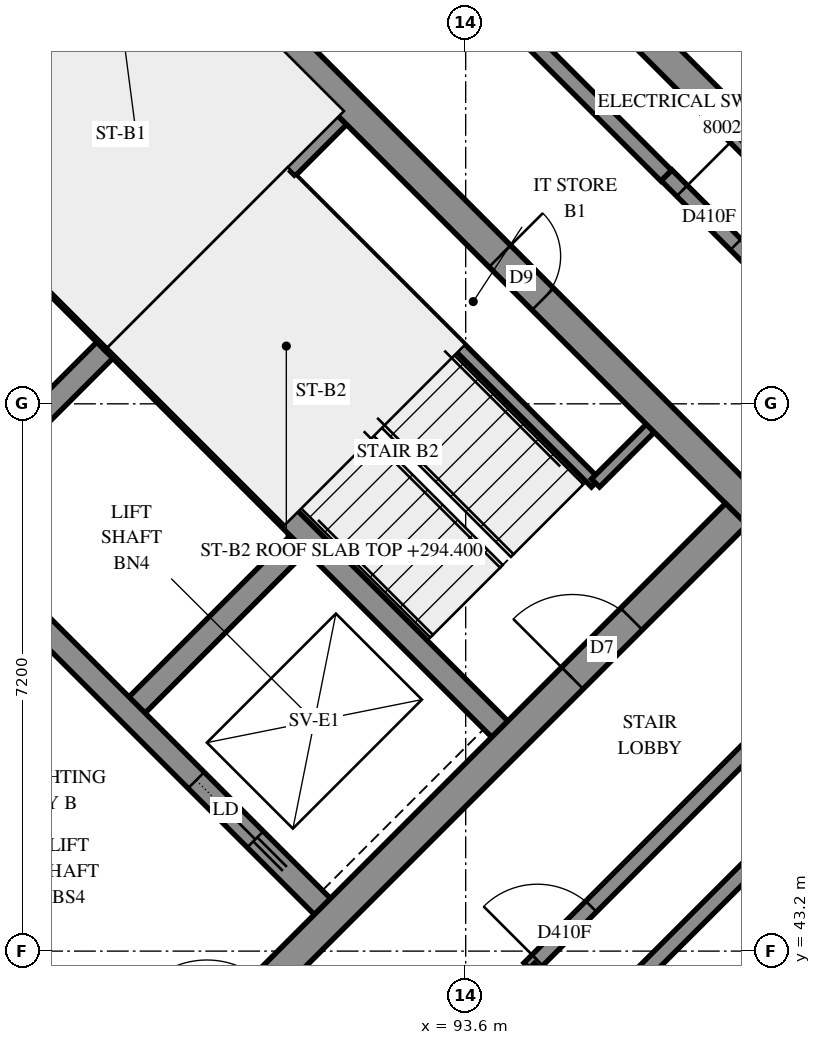
"""IFC4 building model, lengths in metres.
Left out: names, types, materials, properties, quantities, classifications, styles, units other than length and angle.
Written with IfcOpenShell. Run it as: python <this file> out.ifc"""

import sys

from ifc_helpers import new_model, si_unit, direction, frame, frame_2d, origin, place, context, subcontext, project, spatial, polyline, rectangle, outline, extrude, element, fill, save


model = new_model("IFC4")
c1 = context("Model", 3, precision=1e-05, world=origin(), true_north=direction((0.0, 1.0)))
c2 = subcontext(c1, "Body", "Model", "MODEL_VIEW")
j1 = project(units=[si_unit("LENGTHUNIT", "METRE"), si_unit("PLANEANGLEUNIT", "RADIAN")], contexts=[c1])
p1 = place(None, origin())
s1 = spatial("IfcSite", under=j1, at=p1, CompositionType="ELEMENT")
p2 = place(p1, origin())
s2 = spatial("IfcBuilding", under=s1, at=p2, CompositionType="ELEMENT")
p3 = place(p2, frame((0.0, 0.0, 294.4)))
s3 = spatial("IfcBuildingStorey", under=s2, at=p3, CompositionType="ELEMENT", Elevation=294.4)
p4 = place(p3, frame((86.695, 59.696, -0.3), z_axis=(0.0, 0.0, 1.0), x_axis=(0.7071100706, -0.7071034917, 0.0)))
e1 = element("IfcWall", 1, at=p4, inside=s3, PredefinedType="SHEAR", context=c2, shape_type="SweptSolid", body=[
    extrude(outline(polyline([(0.0, 0.0), (15.2, 0.0), (15.2, 3.1), (0.0, 3.1), (0.0, 0.0)])), frame((0.0, 0.2, 0.0), z_axis=(0.0, -1.0, 0.0), x_axis=(1.0, 0.0, 0.0)), (0.0, 0.0, 1.0), 0.4),
])
p5 = place(p4, frame((10.4, 0.0, 0.3)))
e2 = element("IfcOpeningElement", 2, at=p5, cuts=e1, PredefinedType="OPENING", context=c2, shape_type="SweptSolid", body=[
    extrude(rectangle(XDim=0.8, YDim=2.1, at=frame_2d((0.4, 1.05))), frame((0.0, 0.21, 0.0), z_axis=(0.0, -1.0, 0.0), x_axis=(1.0, 0.0, 0.0)), (0.0, 0.0, 1.0), 0.42),
])
p6 = place(p3, frame((86.978, 38.766, -0.3), z_axis=(0.0, 0.0, 1.0), x_axis=(0.7071067812, 0.7071067812, 0.0)))
e3 = element("IfcWall", 3, at=p6, inside=s3, PredefinedType="SHEAR", context=c2, shape_type="SweptSolid", body=[
    extrude(outline(polyline([(0.0, 0.0), (14.4, 0.0), (14.4, 3.1), (0.0, 3.1), (0.0, 0.0)])), frame((0.0, 0.2, 0.0), z_axis=(0.0, -1.0, 0.0), x_axis=(1.0, 0.0, 0.0)), (0.0, 0.0, 1.0), 0.4),
])
p7 = place(p6, frame((4.55, 0.0, 0.3)))
e4 = element("IfcOpeningElement", 4, at=p7, cuts=e3, PredefinedType="OPENING", context=c2, shape_type="SweptSolid", body=[
    extrude(rectangle(XDim=1.1, YDim=2.1, at=frame_2d((0.55, 1.05))), frame((0.0, 0.21, 0.0), z_axis=(0.0, -1.0, 0.0), x_axis=(1.0, 0.0, 0.0)), (0.0, 0.0, 1.0), 0.42),
])
p8 = place(p6, frame((11.35, 0.0, 0.3)))
e5 = element("IfcOpeningElement", 5, at=p8, cuts=e3, PredefinedType="OPENING", context=c2, shape_type="SweptSolid", body=[
    extrude(rectangle(XDim=1.1, YDim=2.1, at=frame_2d((0.55, 1.05))), frame((0.0, 0.21, 0.0), z_axis=(0.0, -1.0, 0.0), x_axis=(1.0, 0.0, 0.0)), (0.0, 0.0, 1.0), 0.42),
])
for number, where, z_axis, x_axis in (
    (6, (86.625, 48.878, 0.0), (0.0, 0.0, 1.0), (0.707, 0.707, 0.0)),
    (7, (89.17, 46.332, 0.0), (0.0, 0.0, 1.0), (0.707, 0.707, 0.0)),
):
    element("IfcWall", number, at=place(p3, frame(where, z_axis=z_axis, x_axis=x_axis)), inside=s3, PredefinedType="SOLIDWALL", context=c2, shape_type="SweptSolid", body=[
        extrude(outline(polyline([(0.0, 0.0), (3.3, 0.0), (3.3, 3.5), (0.0, 3.5), (0.0, 0.0)])), frame((0.0, 0.15, 0.0), z_axis=(0.0, -1.0, 0.0), x_axis=(1.0, 0.0, 0.0)), (0.0, 0.0, 1.0), 0.3),
    ])
p9 = place(p3, frame((78.988, 51.423, 0.0), z_axis=(0.0, 0.0, 1.0), x_axis=(0.7071067812, -0.7071067812, 0.0)))
e8 = element("IfcWall", 8, at=p9, inside=s3, PredefinedType="SOLIDWALL", context=c2, shape_type="SweptSolid", body=[
    extrude(outline(polyline([(0.0, 0.0), (14.4, 0.0), (14.4, 3.5), (0.0, 3.5), (0.0, 0.0)])), frame((0.0, 0.15, 0.0), z_axis=(0.0, -1.0, 0.0), x_axis=(1.0, 0.0, 0.0)), (0.0, 0.0, 1.0), 0.3),
])
p10 = place(p9, frame((12.05, 0.0, 0.0)))
e9 = element("IfcOpeningElement", 9, at=p10, cuts=e8, PredefinedType="OPENING", context=c2, shape_type="SweptSolid", body=[
    extrude(rectangle(XDim=1.1, YDim=2.1, at=frame_2d((0.55, 1.05))), frame((0.0, 0.16, 0.0), z_axis=(0.0, -1.0, 0.0), x_axis=(1.0, 0.0, 0.0)), (0.0, 0.0, 1.0), 0.32),
])
p11 = place(p3, frame((81.534, 53.969, 0.0), z_axis=(0.0, 0.0, 1.0), x_axis=(0.707103309, -0.7071102534, 0.0)))
e10 = element("IfcWall", 10, at=p11, inside=s3, PredefinedType="SOLIDWALL", context=c2, shape_type="SweptSolid", body=[
    extrude(outline(polyline([(0.0, 0.0), (14.4, 0.0), (14.4, 3.5), (0.0, 3.5), (0.0, 0.0)])), frame((0.0, 0.15, 0.0), z_axis=(0.0, -1.0, 0.0), x_axis=(1.0, 0.0, 0.0)), (0.0, 0.0, 1.0), 0.3),
])
p12 = place(p11, frame((12.05, 0.0, 0.0)))
e11 = element("IfcOpeningElement", 11, at=p12, cuts=e10, PredefinedType="OPENING", context=c2, shape_type="SweptSolid", body=[
    extrude(rectangle(XDim=1.1, YDim=2.1, at=frame_2d((0.55, 1.05))), frame((0.0, 0.16, 0.0), z_axis=(0.0, -1.0, 0.0), x_axis=(1.0, 0.0, 0.0)), (0.0, 0.0, 1.0), 0.32),
])
for number, where, z_axis, x_axis in (
    (12, (83.867, 56.302, 0.0), (0.0, 0.0, 1.0), (0.707, -0.707, 0.0)),
    (13, (88.958, 51.211, 0.0), (0.0, 0.0, 1.0), (0.707, -0.707, 0.0)),
):
    element("IfcWall", number, at=place(p3, frame(where, z_axis=z_axis, x_axis=x_axis)), inside=s3, PredefinedType="SOLIDWALL", context=c2, shape_type="SweptSolid", body=[
        extrude(outline(polyline([(0.0, 0.0), (7.2, 0.0), (7.2, 3.5), (0.0, 3.5), (0.0, 0.0)])), frame((0.0, 0.15, 0.0), z_axis=(0.0, -1.0, 0.0), x_axis=(1.0, 0.0, 0.0)), (0.0, 0.0, 1.0), 0.3),
    ])
p13 = place(p3, frame((88.958, 51.211, 0.0), z_axis=(0.0, 0.0, 1.0), x_axis=(0.7071067812, 0.7071067812, 0.0)))
e14 = element("IfcWall", 14, at=p13, inside=s3, PredefinedType="SOLIDWALL", context=c2, shape_type="SweptSolid", body=[
    extrude(outline(polyline([(0.0, 0.0), (4.2, 0.0), (4.2, 3.5), (0.0, 3.5), (0.0, 0.0)])), frame((0.0, 0.15, 0.0), z_axis=(0.0, -1.0, 0.0), x_axis=(1.0, 0.0, 0.0)), (0.0, 0.0, 1.0), 0.3),
])
p14 = place(p3, frame((89.382, 29.856, 0.0), z_axis=(0.0, 0.0, 1.0), x_axis=(0.7071094407, 0.7071041216, 0.0)))
e15 = element("IfcWall", 15, at=p14, inside=s3, PredefinedType="SOLIDWALL", context=c2, shape_type="SweptSolid", body=[
    extrude(outline(polyline([(-0.2, -0.2), (19.0, -0.2), (18.6, 0.2), (0.2, 0.2), (-0.2, -0.2)])), origin(), (0.0, 0.0, 1.0), 3.5),
])
p15 = place(p14, frame((1.9, 0.0, 0.7)))
e16 = element("IfcOpeningElement", 16, at=p15, cuts=e15, PredefinedType="OPENING", context=c2, shape_type="SweptSolid", body=[
    extrude(rectangle(XDim=1.8, YDim=2.2, at=frame_2d((0.9, 1.1))), frame((0.0, 0.21, 0.0), z_axis=(0.0, -1.0, 0.0), x_axis=(1.0, 0.0, 0.0)), (0.0, 0.0, 1.0), 0.42),
])
p16 = place(p14, frame((5.5, 0.0, 0.7)))
e17 = element("IfcOpeningElement", 17, at=p16, cuts=e15, PredefinedType="OPENING", context=c2, shape_type="SweptSolid", body=[
    extrude(rectangle(XDim=1.8, YDim=2.2, at=frame_2d((0.9, 1.1))), frame((0.0, 0.21, 0.0), z_axis=(0.0, -1.0, 0.0), x_axis=(1.0, 0.0, 0.0)), (0.0, 0.0, 1.0), 0.42),
])
p17 = place(p14, frame((8.8, 0.0, 0.7)))
e18 = element("IfcOpeningElement", 18, at=p17, cuts=e15, PredefinedType="OPENING", context=c2, shape_type="SweptSolid", body=[
    extrude(rectangle(XDim=1.8, YDim=2.2, at=frame_2d((0.9, 1.1))), frame((0.0, 0.21, 0.0), z_axis=(0.0, -1.0, 0.0), x_axis=(1.0, 0.0, 0.0)), (0.0, 0.0, 1.0), 0.42),
])
p18 = place(p14, frame((12.95, 0.0, 0.7)))
e19 = element("IfcOpeningElement", 19, at=p18, cuts=e15, PredefinedType="OPENING", context=c2, shape_type="SweptSolid", body=[
    extrude(rectangle(XDim=1.8, YDim=2.2, at=frame_2d((0.9, 1.1))), frame((0.0, 0.21, 0.0), z_axis=(0.0, -1.0, 0.0), x_axis=(1.0, 0.0, 0.0)), (0.0, 0.0, 1.0), 0.42),
])
p19 = place(p14, frame((16.0, 0.0, 0.7)))
e20 = element("IfcOpeningElement", 20, at=p19, cuts=e15, PredefinedType="OPENING", context=c2, shape_type="SweptSolid", body=[
    extrude(rectangle(XDim=1.8, YDim=2.2, at=frame_2d((0.9, 1.1))), frame((0.0, 0.21, 0.0), z_axis=(0.0, -1.0, 0.0), x_axis=(1.0, 0.0, 0.0)), (0.0, 0.0, 1.0), 0.42),
])
p20 = place(p3, frame((100.48, 52.134, 0.0), z_axis=(0.0, 0.0, 1.0), x_axis=(-0.7071067812, 0.7071067812, 0.0)))
e21 = element("IfcWall", 21, at=p20, inside=s3, PredefinedType="SOLIDWALL", context=c2, shape_type="SweptSolid", body=[
    extrude(outline(polyline([(0.036, -0.2), (6.718, -0.2), (6.718, 0.2), (-0.036, 0.2), (0.036, -0.2)])), origin(), (0.0, 0.0, 1.0), 3.5),
])
p21 = place(p20, frame((1.147, 0.0, 0.7)))
e22 = element("IfcOpeningElement", 22, at=p21, cuts=e21, PredefinedType="OPENING", context=c2, shape_type="SweptSolid", body=[
    extrude(rectangle(XDim=1.8, YDim=2.2, at=frame_2d((0.9, 1.1))), frame((0.0, 0.21, 0.0), z_axis=(0.0, -1.0, 0.0), x_axis=(1.0, 0.0, 0.0)), (0.0, 0.0, 1.0), 0.42),
])
p22 = place(p20, frame((4.306, 0.0, 0.7)))
e23 = element("IfcOpeningElement", 23, at=p22, cuts=e21, PredefinedType="OPENING", context=c2, shape_type="SweptSolid", body=[
    extrude(rectangle(XDim=1.8, YDim=2.2, at=frame_2d((0.9, 1.1))), frame((0.0, 0.21, 0.0), z_axis=(0.0, -1.0, 0.0), x_axis=(1.0, 0.0, 0.0)), (0.0, 0.0, 1.0), 0.42),
])
p23 = place(p3, frame((91.313, 53.354, 0.0), z_axis=(0.0, 0.0, 1.0), x_axis=(0.7071067812, -0.7071067812, 0.0)))
e24 = element("IfcWall", 24, at=p23, inside=s3, PredefinedType="PARTITIONING", context=c2, shape_type="SweptSolid", body=[
    extrude(outline(polyline([(0.0, 0.0), (5.65, 0.0), (5.65, 3.5), (0.0, 3.5), (0.0, 0.0)])), frame((0.0, 0.075, 0.0), z_axis=(0.0, -1.0, 0.0), x_axis=(1.0, 0.0, 0.0)), (0.0, 0.0, 1.0), 0.15),
])
p24 = place(p3, frame((95.308, 49.358, 0.0), z_axis=(0.0, 0.0, 1.0), x_axis=(0.70705776, 0.707155799, 0.0)))
e25 = element("IfcWall", 25, at=p24, inside=s3, PredefinedType="PARTITIONING", context=c2, shape_type="SweptSolid", body=[
    extrude(outline(polyline([(0.0, 0.0), (1.02, 0.0), (1.02, 3.5), (0.0, 3.5), (0.0, 0.0)])), frame((0.0, 0.075, 0.0), z_axis=(0.0, -1.0, 0.0), x_axis=(1.0, 0.0, 0.0)), (0.0, 0.0, 1.0), 0.15),
])
p25 = place(p3, frame((86.833, 62.805, 0.0), z_axis=(0.0, 0.0, 1.0), x_axis=(0.7072045138, -0.7070090351, 0.0)))
e26 = element("IfcWall", 26, at=p25, inside=s3, PredefinedType="PARTITIONING", context=c2, shape_type="SweptSolid", body=[
    extrude(rectangle(XDim=13.301, YDim=0.2, at=frame_2d((6.65, 0.0))), origin(), (0.0, 0.0, 1.0), 3.5),
])
p26 = place(p25, frame((6.387, 0.0, 0.0)))
e27 = element("IfcOpeningElement", 27, at=p26, cuts=e26, PredefinedType="OPENING", context=c2, shape_type="SweptSolid", body=[
    extrude(rectangle(XDim=1.0, YDim=2.1, at=frame_2d((0.5, 1.05))), frame((0.0, 0.11, 0.0), z_axis=(0.0, -1.0, 0.0), x_axis=(1.0, 0.0, 0.0)), (0.0, 0.0, 1.0), 0.22),
])
p27 = place(p3, frame((94.438, 42.974, 0.0), z_axis=(0.0, 0.0, 1.0), x_axis=(0.7071067812, 0.7071067812, 0.0)))
e28 = element("IfcWall", 28, at=p27, inside=s3, PredefinedType="PARTITIONING", context=c2, shape_type="SweptSolid", body=[
    extrude(rectangle(XDim=8.649, YDim=0.2, at=frame_2d((4.325, 0.0))), origin(), (0.0, 0.0, 1.0), 3.5),
])
p28 = place(p27, frame((0.15, 0.0, 0.0)))
e29 = element("IfcOpeningElement", 29, at=p28, cuts=e28, PredefinedType="OPENING", context=c2, shape_type="SweptSolid", body=[
    extrude(rectangle(XDim=1.0, YDim=2.1, at=frame_2d((0.5, 1.05))), frame((0.0, 0.11, 0.0), z_axis=(0.0, -1.0, 0.0), x_axis=(1.0, 0.0, 0.0)), (0.0, 0.0, 1.0), 0.22),
])
p29 = place(p3, frame((94.434, 42.971, 0.0), z_axis=(0.0, 0.0, 1.0), x_axis=(0.7071067812, -0.7071067812, 0.0)))
e30 = element("IfcWall", 30, at=p29, inside=s3, PredefinedType="PARTITIONING", context=c2, shape_type="SweptSolid", body=[
    extrude(rectangle(XDim=4.701, YDim=0.2, at=frame_2d((2.35, 0.0))), origin(), (0.0, 0.0, 1.0), 3.5),
])
p30 = place(p29, frame((1.626, 0.0, 0.0)))
e31 = element("IfcOpeningElement", 31, at=p30, cuts=e30, PredefinedType="OPENING", context=c2, shape_type="SweptSolid", body=[
    extrude(rectangle(XDim=1.0, YDim=2.1, at=frame_2d((0.5, 1.05))), frame((0.0, 0.11, 0.0), z_axis=(0.0, -1.0, 0.0), x_axis=(1.0, 0.0, 0.0)), (0.0, 0.0, 1.0), 0.22),
])
p31 = place(p3, frame((96.244, 53.406, 0.0), z_axis=(0.0, 0.0, 1.0), x_axis=(0.7068288851, -0.7073845681, 0.0)))
e32 = element("IfcWall", 32, at=p31, inside=s3, PredefinedType="PARTITIONING", context=c2, shape_type="SweptSolid", body=[
    extrude(rectangle(XDim=3.599, YDim=0.2, at=frame_2d((1.8, 0.0))), origin(), (0.0, 0.0, 1.0), 3.5),
])
p32 = place(p31, frame((0.286, 0.0, 0.0)))
e33 = element("IfcOpeningElement", 33, at=p32, cuts=e32, PredefinedType="OPENING", context=c2, shape_type="SweptSolid", body=[
    extrude(rectangle(XDim=1.0, YDim=2.1, at=frame_2d((0.5, 1.05))), frame((0.0, 0.11, 0.0), z_axis=(0.0, -1.0, 0.0), x_axis=(1.0, 0.0, 0.0)), (0.0, 0.0, 1.0), 0.22),
])
p33 = place(p3, frame((95.217, 42.195, 0.0), z_axis=(0.0, 0.0, 1.0), x_axis=(0.7072806841, 0.7069328355, 0.0)))
e34 = element("IfcWall", 34, at=p33, inside=s3, PredefinedType="PARTITIONING", context=c2, shape_type="SweptSolid", body=[
    extrude(outline(polyline([(0.0, -0.1), (5.75, -0.1), (5.75, 0.1), (0.0, 0.1), (0.0, -0.1)])), origin(), (0.0, 0.0, 1.0), 3.5),
])
p34 = place(p5, origin())
e35 = element("IfcDoor", 35, at=p34, inside=s3, OperationType="SINGLE_SWING_RIGHT", PredefinedType="DOOR", context=c2, shape_type="SweptSolid", body=[
    extrude(rectangle(XDim=0.8, YDim=2.1, at=frame_2d((0.4, 1.05))), frame((0.0, 0.025, 0.0), z_axis=(0.0, -1.0, 0.0), x_axis=(1.0, 0.0, 0.0)), (0.0, 0.0, 1.0), 0.05),
])
fill(e2, e35)
p35 = place(p8, origin())
e36 = element("IfcDoor", 36, at=p35, inside=s3, OperationType="SINGLE_SWING_RIGHT", PredefinedType="DOOR", context=c2, shape_type="SweptSolid", body=[
    extrude(rectangle(XDim=1.1, YDim=2.1, at=frame_2d((0.55, 1.05))), frame((0.0, 0.025, 0.0), z_axis=(0.0, -1.0, 0.0), x_axis=(1.0, 0.0, 0.0)), (0.0, 0.0, 1.0), 0.05),
])
fill(e5, e36)
p36 = place(p12, origin())
e37 = element("IfcDoor", 37, at=p36, inside=s3, OperationType="SLIDING_TO_RIGHT", PredefinedType="DOOR", context=c2, shape_type="SweptSolid", body=[
    extrude(rectangle(XDim=1.1, YDim=2.1, at=frame_2d((0.55, 1.05))), frame((0.0, 0.025, 0.0), z_axis=(0.0, -1.0, 0.0), x_axis=(1.0, 0.0, 0.0)), (0.0, 0.0, 1.0), 0.05),
])
fill(e11, e37)
p37 = place(p28, origin())
e38 = element("IfcDoor", 38, at=p37, inside=s3, OperationType="SINGLE_SWING_LEFT", PredefinedType="DOOR", context=c2, shape_type="SweptSolid", body=[
    extrude(rectangle(XDim=1.0, YDim=2.1, at=frame_2d((0.5, 1.05))), frame((0.0, 0.025, 0.0), z_axis=(0.0, -1.0, 0.0), x_axis=(1.0, 0.0, 0.0)), (0.0, 0.0, 1.0), 0.05),
])
fill(e29, e38)
p38 = place(p32, origin())
e39 = element("IfcDoor", 39, at=p38, inside=s3, OperationType="SINGLE_SWING_LEFT", PredefinedType="DOOR", context=c2, shape_type="SweptSolid", body=[
    extrude(rectangle(XDim=1.0, YDim=2.1, at=frame_2d((0.5, 1.05))), frame((0.0, 0.025, 0.0), z_axis=(0.0, -1.0, 0.0), x_axis=(1.0, 0.0, 0.0)), (0.0, 0.0, 1.0), 0.05),
])
fill(e33, e39)
save(model, sys.argv[1])
